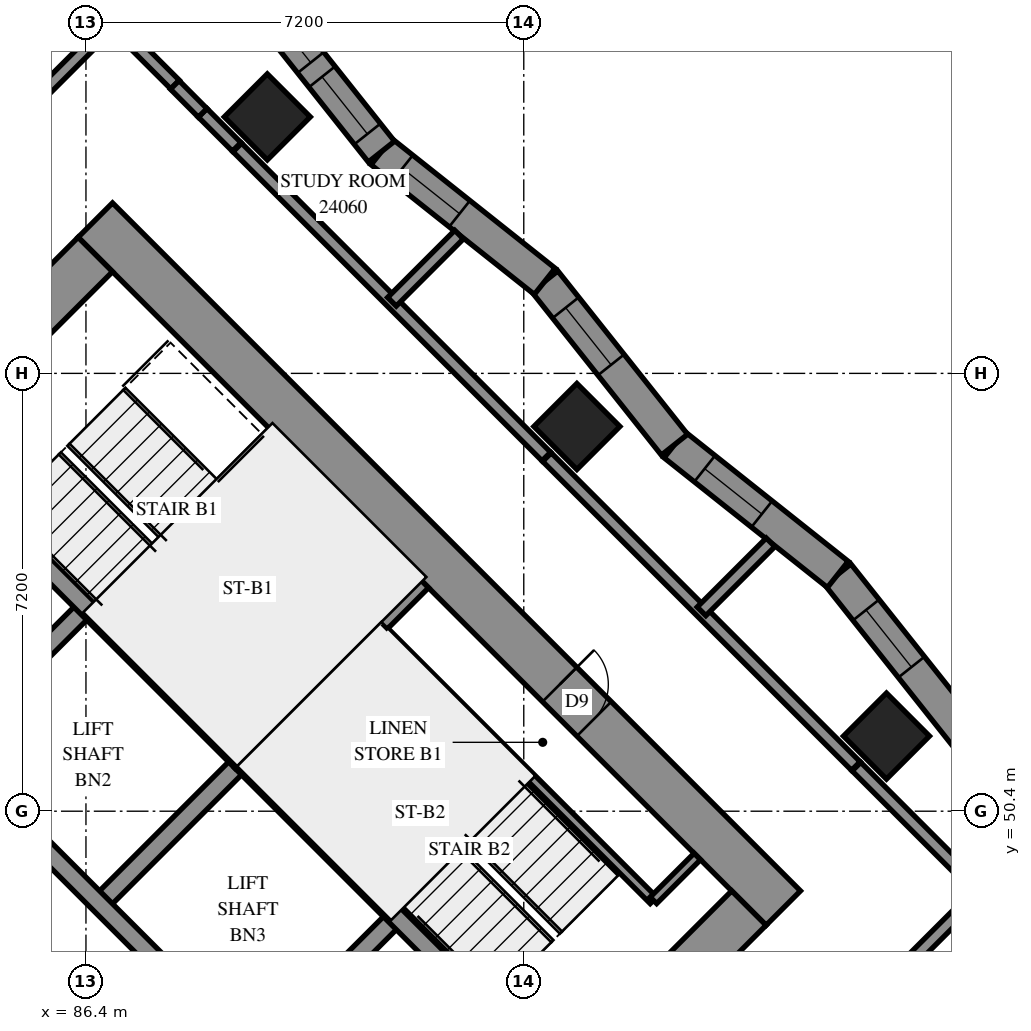
"""IFC4 building model, lengths in metres.
Left out: names, types, materials, properties, quantities, classifications, styles, units other than length and angle.
Written with IfcOpenShell. Run it as: python <this file> out.ifc"""

import sys

from ifc_helpers import new_model, si_unit, direction, frame, frame_2d, origin, origin_2d, place, context, subcontext, project, spatial, polyline, rectangle, outline, extrude, element, fill, save


model = new_model("IFC4")
c1 = context("Model", 3, precision=1e-05, world=origin(), true_north=direction((0.0, 1.0)))
c2 = subcontext(c1, "Body", "Model", "MODEL_VIEW")
j1 = project(units=[si_unit("LENGTHUNIT", "METRE"), si_unit("PLANEANGLEUNIT", "RADIAN")], contexts=[c1])
p1 = place(None, origin())
s1 = spatial("IfcSite", under=j1, at=p1, CompositionType="ELEMENT")
p2 = place(p1, origin())
s2 = spatial("IfcBuilding", under=s1, at=p2, CompositionType="ELEMENT")
p3 = place(p2, frame((0.0, 0.0, 91.4)))
s3 = spatial("IfcBuildingStorey", under=s2, at=p3, CompositionType="ELEMENT", Elevation=91.4)
for number, where, z_axis, x_axis in (
    (1, (89.382, 61.818, 0.0), (0.0, 0.0, 1.0), (0.707, -0.707, 0.0)),
    (2, (94.474, 56.727, 0.0), (0.0, 0.0, 1.0), (0.707, -0.707, 0.0)),
    (3, (99.565, 51.635, 0.0), (0.0, 0.0, 1.0), (0.707, -0.707, 0.0)),
):
    element("IfcColumn", number, at=place(p3, frame(where, z_axis=z_axis, x_axis=x_axis)), inside=s3, PredefinedType="COLUMN", context=c2, shape_type="SweptSolid", body=[
        extrude(rectangle(XDim=1.0, YDim=1.0, at=origin_2d()), origin(), (0.0, 0.0, 1.0), 3.1),
    ])
p4 = place(p3, frame((75.806, 49.373, -0.3), z_axis=(0.0, 0.0, 1.0), x_axis=(0.7071067812, -0.7071067812, 0.0)))
e4 = element("IfcWall", 4, at=p4, inside=s3, PredefinedType="SHEAR", context=c2, shape_type="SweptSolid", body=[
    extrude(rectangle(XDim=16.0, YDim=0.8, at=frame_2d((8.0, 0.0))), origin(), (0.0, 0.0, 1.0), 2.7),
])
p5 = place(p3, frame((86.554, 60.121, -0.3), z_axis=(0.0, 0.0, 1.0), x_axis=(0.7071067812, -0.7071067812, 0.0)))
e5 = element("IfcWall", 5, at=p5, inside=s3, PredefinedType="SHEAR", context=c2, shape_type="SweptSolid", body=[
    extrude(rectangle(XDim=16.0, YDim=0.8, at=frame_2d((8.0, 0.0))), origin(), (0.0, 0.0, 1.0), 2.7),
])
p6 = place(p5, frame((10.8, 0.0, 0.3)))
e6 = element("IfcOpeningElement", 6, at=p6, cuts=e5, PredefinedType="OPENING", context=c2, shape_type="SweptSolid", body=[
    extrude(rectangle(XDim=0.8, YDim=2.1, at=frame_2d((0.4, 1.05))), frame((0.0, 0.41, 0.0), z_axis=(0.0, -1.0, 0.0), x_axis=(1.0, 0.0, 0.0)), (0.0, 0.0, 1.0), 0.82),
])
p7 = place(p3, frame((76.372, 49.373, -0.3), z_axis=(0.0, 0.0, 1.0), x_axis=(0.7071067812, 0.7071067812, 0.0)))
e7 = element("IfcWall", 7, at=p7, inside=s3, PredefinedType="SHEAR", context=c2, shape_type="SweptSolid", body=[
    extrude(rectangle(XDim=14.4, YDim=0.8, at=frame_2d((7.2, 0.0))), origin(), (0.0, 0.0, 1.0), 2.7),
])
p8 = place(p7, frame((4.55, 0.0, 0.3)))
e8 = element("IfcOpeningElement", 8, at=p8, cuts=e7, PredefinedType="OPENING", context=c2, shape_type="SweptSolid", body=[
    extrude(rectangle(XDim=1.1, YDim=2.1, at=frame_2d((0.55, 1.05))), frame((0.0, 0.41, 0.0), z_axis=(0.0, -1.0, 0.0), x_axis=(1.0, 0.0, 0.0)), (0.0, 0.0, 1.0), 0.82),
])
p9 = place(p7, frame((11.35, 0.0, 0.3)))
e9 = element("IfcOpeningElement", 9, at=p9, cuts=e7, PredefinedType="OPENING", context=c2, shape_type="SweptSolid", body=[
    extrude(rectangle(XDim=1.1, YDim=2.1, at=frame_2d((0.55, 1.05))), frame((0.0, 0.41, 0.0), z_axis=(0.0, -1.0, 0.0), x_axis=(1.0, 0.0, 0.0)), (0.0, 0.0, 1.0), 0.82),
])
p10 = place(p3, frame((87.12, 38.625, -0.3), z_axis=(0.0, 0.0, 1.0), x_axis=(0.7071067812, 0.7071067812, 0.0)))
e10 = element("IfcWall", 10, at=p10, inside=s3, PredefinedType="SHEAR", context=c2, shape_type="SweptSolid", body=[
    extrude(rectangle(XDim=14.4, YDim=0.8, at=frame_2d((7.2, 0.0))), origin(), (0.0, 0.0, 1.0), 2.7),
])
p11 = place(p10, frame((4.55, 0.0, 0.3)))
e11 = element("IfcOpeningElement", 11, at=p11, cuts=e10, PredefinedType="OPENING", context=c2, shape_type="SweptSolid", body=[
    extrude(rectangle(XDim=1.1, YDim=2.1, at=frame_2d((0.55, 1.05))), frame((0.0, 0.41, 0.0), z_axis=(0.0, -1.0, 0.0), x_axis=(1.0, 0.0, 0.0)), (0.0, 0.0, 1.0), 0.82),
])
p12 = place(p10, frame((11.35, 0.0, 0.3)))
e12 = element("IfcOpeningElement", 12, at=p12, cuts=e10, PredefinedType="OPENING", context=c2, shape_type="SweptSolid", body=[
    extrude(rectangle(XDim=1.1, YDim=2.1, at=frame_2d((0.55, 1.05))), frame((0.0, 0.41, 0.0), z_axis=(0.0, -1.0, 0.0), x_axis=(1.0, 0.0, 0.0)), (0.0, 0.0, 1.0), 0.82),
])
p13 = place(p3, frame((84.079, 51.423, 0.0), z_axis=(0.0, 0.0, 1.0), x_axis=(0.7071219326, 0.7070916295, 0.0)))
e13 = element("IfcWall", 13, at=p13, inside=s3, PredefinedType="SOLIDWALL", context=c2, shape_type="SweptSolid", body=[
    extrude(rectangle(XDim=3.3, YDim=0.3, at=frame_2d((1.65, 0.0))), origin(), (0.0, 0.0, 1.0), 3.1),
])
for number, where, z_axis, x_axis in (
    (14, (86.625, 48.878, 0.0), (0.0, 0.0, 1.0), (0.707, 0.707, 0.0)),
    (15, (89.17, 46.332, 0.0), (0.0, 0.0, 1.0), (0.707, 0.707, 0.0)),
):
    element("IfcWall", number, at=place(p3, frame(where, z_axis=z_axis, x_axis=x_axis)), inside=s3, PredefinedType="SOLIDWALL", context=c2, shape_type="SweptSolid", body=[
        extrude(rectangle(XDim=3.3, YDim=0.3, at=frame_2d((1.65, 0.0))), origin(), (0.0, 0.0, 1.0), 3.1),
    ])
p14 = place(p3, frame((78.988, 51.423, 0.0), z_axis=(0.0, 0.0, 1.0), x_axis=(0.7071067812, -0.7071067812, 0.0)))
e16 = element("IfcWall", 16, at=p14, inside=s3, PredefinedType="SOLIDWALL", context=c2, shape_type="SweptSolid", body=[
    extrude(rectangle(XDim=14.4, YDim=0.3, at=frame_2d((7.2, 0.0))), origin(), (0.0, 0.0, 1.0), 3.1),
])
p15 = place(p14, frame((1.25, 0.0, 0.0)))
e17 = element("IfcOpeningElement", 17, at=p15, cuts=e16, PredefinedType="OPENING", context=c2, shape_type="SweptSolid", body=[
    extrude(rectangle(XDim=1.1, YDim=2.1, at=frame_2d((0.55, 1.05))), frame((0.0, 0.16, 0.0), z_axis=(0.0, -1.0, 0.0), x_axis=(1.0, 0.0, 0.0)), (0.0, 0.0, 1.0), 0.32),
])
p16 = place(p14, frame((4.85, 0.0, 0.0)))
e18 = element("IfcOpeningElement", 18, at=p16, cuts=e16, PredefinedType="OPENING", context=c2, shape_type="SweptSolid", body=[
    extrude(rectangle(XDim=1.1, YDim=2.1, at=frame_2d((0.55, 1.05))), frame((0.0, 0.16, 0.0), z_axis=(0.0, -1.0, 0.0), x_axis=(1.0, 0.0, 0.0)), (0.0, 0.0, 1.0), 0.32),
])
p17 = place(p14, frame((8.45, 0.0, 0.0)))
e19 = element("IfcOpeningElement", 19, at=p17, cuts=e16, PredefinedType="OPENING", context=c2, shape_type="SweptSolid", body=[
    extrude(rectangle(XDim=1.1, YDim=2.1, at=frame_2d((0.55, 1.05))), frame((0.0, 0.16, 0.0), z_axis=(0.0, -1.0, 0.0), x_axis=(1.0, 0.0, 0.0)), (0.0, 0.0, 1.0), 0.32),
])
p18 = place(p14, frame((12.05, 0.0, 0.0)))
e20 = element("IfcOpeningElement", 20, at=p18, cuts=e16, PredefinedType="OPENING", context=c2, shape_type="SweptSolid", body=[
    extrude(rectangle(XDim=1.1, YDim=2.1, at=frame_2d((0.55, 1.05))), frame((0.0, 0.16, 0.0), z_axis=(0.0, -1.0, 0.0), x_axis=(1.0, 0.0, 0.0)), (0.0, 0.0, 1.0), 0.32),
])
p19 = place(p3, frame((81.534, 53.969, 0.0), z_axis=(0.0, 0.0, 1.0), x_axis=(0.707103309, -0.7071102534, 0.0)))
e21 = element("IfcWall", 21, at=p19, inside=s3, PredefinedType="SOLIDWALL", context=c2, shape_type="SweptSolid", body=[
    extrude(rectangle(XDim=14.4, YDim=0.3, at=frame_2d((7.2, 0.0))), origin(), (0.0, 0.0, 1.0), 3.1),
])
p20 = place(p19, frame((12.05, 0.0, 0.0)))
e22 = element("IfcOpeningElement", 22, at=p20, cuts=e21, PredefinedType="OPENING", context=c2, shape_type="SweptSolid", body=[
    extrude(rectangle(XDim=1.1, YDim=2.1, at=frame_2d((0.55, 1.05))), frame((0.0, 0.16, 0.0), z_axis=(0.0, -1.0, 0.0), x_axis=(1.0, 0.0, 0.0)), (0.0, 0.0, 1.0), 0.32),
])
for number, where, z_axis, x_axis in (
    (23, (83.867, 56.302, 0.0), (0.0, 0.0, 1.0), (0.707, -0.707, 0.0)),
    (24, (88.958, 51.211, 0.0), (0.0, 0.0, 1.0), (0.707, -0.707, 0.0)),
):
    element("IfcWall", number, at=place(p3, frame(where, z_axis=z_axis, x_axis=x_axis)), inside=s3, PredefinedType="SOLIDWALL", context=c2, shape_type="SweptSolid", body=[
        extrude(rectangle(XDim=7.2, YDim=0.3, at=frame_2d((3.6, 0.0))), origin(), (0.0, 0.0, 1.0), 3.1),
    ])
p21 = place(p3, frame((88.958, 51.211, 0.0), z_axis=(0.0, 0.0, 1.0), x_axis=(0.7071067812, 0.7071067812, 0.0)))
e25 = element("IfcWall", 25, at=p21, inside=s3, PredefinedType="SOLIDWALL", context=c2, shape_type="SweptSolid", body=[
    extrude(rectangle(XDim=4.2, YDim=0.3, at=frame_2d((2.1, 0.0))), origin(), (0.0, 0.0, 1.0), 3.1),
])
p22 = place(p3, frame((100.897, 51.608, 0.0), z_axis=(0.0, 0.0, 1.0), x_axis=(-0.621900023, 0.7830966489, 0.0)))
e26 = element("IfcWall", 26, at=p22, inside=s3, PredefinedType="SOLIDWALL", context=c2, shape_type="SweptSolid", body=[
    extrude(outline(polyline([(0.032, -0.275), (3.462, -0.275), (3.398, 0.275), (-0.032, 0.275), (0.032, -0.275)])), origin(), (0.0, 0.0, 1.0), 3.1),
])
p23 = place(p22, frame((1.483, 0.0, 0.5)))
e27 = element("IfcOpeningElement", 27, at=p23, cuts=e26, PredefinedType="OPENING", context=c2, shape_type="SweptSolid", body=[
    extrude(rectangle(XDim=1.2, YDim=2.45, at=frame_2d((0.6, 1.225))), frame((0.0, 0.285, 0.0), z_axis=(0.0, -1.0, 0.0), x_axis=(1.0, 0.0, 0.0)), (0.0, 0.0, 1.0), 0.57),
])
p24 = place(p3, frame((98.764, 54.294, 0.0), z_axis=(0.0, 0.0, 1.0), x_axis=(-0.7831079243, 0.6218858246, 0.0)))
e28 = element("IfcWall", 28, at=p24, inside=s3, PredefinedType="SOLIDWALL", context=c2, shape_type="SweptSolid", body=[
    extrude(outline(polyline([(-0.032, -0.275), (3.398, -0.275), (3.462, 0.275), (0.032, 0.275), (-0.032, -0.275)])), origin(), (0.0, 0.0, 1.0), 3.1),
])
p25 = place(p24, frame((1.596, 0.0, 0.5)))
e29 = element("IfcOpeningElement", 29, at=p25, cuts=e28, PredefinedType="OPENING", context=c2, shape_type="SweptSolid", body=[
    extrude(rectangle(XDim=1.2, YDim=2.45, at=frame_2d((0.6, 1.225))), frame((0.0, 0.285, 0.0), z_axis=(0.0, -1.0, 0.0), x_axis=(1.0, 0.0, 0.0)), (0.0, 0.0, 1.0), 0.57),
])
p26 = place(p3, frame((96.078, 56.427, 0.0), z_axis=(0.0, 0.0, 1.0), x_axis=(-0.6218858246, 0.7831079243, 0.0)))
e30 = element("IfcWall", 30, at=p26, inside=s3, PredefinedType="SOLIDWALL", context=c2, shape_type="SweptSolid", body=[
    extrude(outline(polyline([(0.032, -0.275), (3.462, -0.275), (3.398, 0.275), (-0.032, 0.275), (0.032, -0.275)])), origin(), (0.0, 0.0, 1.0), 3.1),
])
p27 = place(p26, frame((1.677, 0.0, 0.5)))
e31 = element("IfcOpeningElement", 31, at=p27, cuts=e30, PredefinedType="OPENING", context=c2, shape_type="SweptSolid", body=[
    extrude(rectangle(XDim=1.2, YDim=2.45, at=frame_2d((0.6, 1.225))), frame((0.0, 0.285, 0.0), z_axis=(0.0, -1.0, 0.0), x_axis=(1.0, 0.0, 0.0)), (0.0, 0.0, 1.0), 0.57),
])
p28 = place(p3, frame((93.945, 59.113, 0.0), z_axis=(0.0, 0.0, 1.0), x_axis=(-0.7830966489, 0.621900023, 0.0)))
e32 = element("IfcWall", 32, at=p28, inside=s3, PredefinedType="SOLIDWALL", context=c2, shape_type="SweptSolid", body=[
    extrude(outline(polyline([(-0.032, -0.275), (3.398, -0.275), (3.462, 0.275), (0.032, 0.275), (-0.032, -0.275)])), origin(), (0.0, 0.0, 1.0), 3.1),
])
p29 = place(p28, frame((1.789, 0.0, 0.5)))
e33 = element("IfcOpeningElement", 33, at=p29, cuts=e32, PredefinedType="OPENING", context=c2, shape_type="SweptSolid", body=[
    extrude(rectangle(XDim=1.2, YDim=2.45, at=frame_2d((0.6, 1.225))), frame((0.0, 0.285, 0.0), z_axis=(0.0, -1.0, 0.0), x_axis=(1.0, 0.0, 0.0)), (0.0, 0.0, 1.0), 0.57),
])
p30 = place(p3, frame((91.259, 61.246, 0.0), z_axis=(0.0, 0.0, 1.0), x_axis=(-0.6218858246, 0.7831079243, 0.0)))
e34 = element("IfcWall", 34, at=p30, inside=s3, PredefinedType="SOLIDWALL", context=c2, shape_type="SweptSolid", body=[
    extrude(outline(polyline([(0.032, -0.275), (3.462, -0.275), (3.398, 0.275), (-0.032, 0.275), (0.032, -0.275)])), origin(), (0.0, 0.0, 1.0), 3.1),
])
p31 = place(p30, frame((0.371, 0.0, 0.5)))
e35 = element("IfcOpeningElement", 35, at=p31, cuts=e34, PredefinedType="OPENING", context=c2, shape_type="SweptSolid", body=[
    extrude(rectangle(XDim=1.2, YDim=2.45, at=frame_2d((0.6, 1.225))), frame((0.0, 0.285, 0.0), z_axis=(0.0, -1.0, 0.0), x_axis=(1.0, 0.0, 0.0)), (0.0, 0.0, 1.0), 0.57),
])
p32 = place(p30, frame((1.87, 0.0, 0.5)))
e36 = element("IfcOpeningElement", 36, at=p32, cuts=e34, PredefinedType="OPENING", context=c2, shape_type="SweptSolid", body=[
    extrude(rectangle(XDim=1.2, YDim=2.45, at=frame_2d((0.6, 1.225))), frame((0.0, 0.285, 0.0), z_axis=(0.0, -1.0, 0.0), x_axis=(1.0, 0.0, 0.0)), (0.0, 0.0, 1.0), 0.57),
])
p33 = place(p3, frame((91.313, 53.354, 0.0), z_axis=(0.0, 0.0, 1.0), x_axis=(0.7071147811, -0.7070987812, 0.0)))
e37 = element("IfcWall", 37, at=p33, inside=s3, PredefinedType="PARTITIONING", context=c2, shape_type="SweptSolid", body=[
    extrude(rectangle(XDim=6.25, YDim=0.15, at=frame_2d((3.125, 0.0))), origin(), (0.0, 0.0, 1.0), 3.1),
])
p34 = place(p3, frame((95.732, 48.934, 0.0), z_axis=(0.0, 0.0, 1.0), x_axis=(0.7071067812, 0.7071067812, 0.0)))
e38 = element("IfcWall", 38, at=p34, inside=s3, PredefinedType="PARTITIONING", context=c2, shape_type="SweptSolid", body=[
    extrude(rectangle(XDim=1.02, YDim=0.15, at=frame_2d((0.51, 0.0))), origin(), (0.0, 0.0, 1.0), 3.1),
])
p35 = place(p3, frame((94.615, 42.587, 0.0), z_axis=(0.0, 0.0, 1.0), x_axis=(0.7071067812, 0.7071067812, 0.0)))
e39 = element("IfcWall", 39, at=p35, inside=s3, PredefinedType="PARTITIONING", context=c2, shape_type="SweptSolid", body=[
    extrude(rectangle(XDim=9.198, YDim=0.2, at=frame_2d((4.599, 0.0))), origin(), (0.0, 0.0, 1.0), 3.1),
])
p36 = place(p35, frame((0.248, 0.0, 0.0)))
e40 = element("IfcOpeningElement", 40, at=p36, cuts=e39, PredefinedType="OPENING", context=c2, shape_type="SweptSolid", body=[
    extrude(rectangle(XDim=1.0, YDim=2.1, at=frame_2d((0.5, 1.05))), frame((0.0, 0.11, 0.0), z_axis=(0.0, -1.0, 0.0), x_axis=(1.0, 0.0, 0.0)), (0.0, 0.0, 1.0), 0.22),
])
p37 = place(p3, frame((80.949, 58.477, 0.0), z_axis=(0.0, 0.0, 1.0), x_axis=(0.7071122504, 0.707101312, 0.0)))
e41 = element("IfcWall", 41, at=p37, inside=s3, PredefinedType="PARTITIONING", context=c2, shape_type="SweptSolid", body=[
    extrude(rectangle(XDim=9.142, YDim=0.2, at=frame_2d((4.571, 0.0))), origin(), (0.0, 0.0, 1.0), 3.1),
])
p38 = place(p3, frame((96.805, 43.787, 0.0), z_axis=(0.0, 0.0, 1.0), x_axis=(0.7071126983, 0.707100864, 0.0)))
e42 = element("IfcWall", 42, at=p38, inside=s3, PredefinedType="PARTITIONING", context=c2, shape_type="SweptSolid", body=[
    extrude(rectangle(XDim=8.45, YDim=0.2, at=frame_2d((4.225, 0.0))), origin(), (0.0, 0.0, 1.0), 3.1),
])
p39 = place(p3, frame((80.951, 57.489, 0.0), z_axis=(0.0, 0.0, 1.0), x_axis=(0.7071067812, 0.7071067812, 0.0)))
e43 = element("IfcWall", 43, at=p39, inside=s3, PredefinedType="PARTITIONING", context=c2, shape_type="SweptSolid", body=[
    extrude(rectangle(XDim=8.321, YDim=0.2, at=frame_2d((4.161, 0.0))), origin(), (0.0, 0.0, 1.0), 3.1),
])
p40 = place(p39, frame((0.851, 0.0, 0.0)))
e44 = element("IfcOpeningElement", 44, at=p40, cuts=e43, PredefinedType="OPENING", context=c2, shape_type="SweptSolid", body=[
    extrude(rectangle(XDim=1.0, YDim=2.1, at=frame_2d((0.5, 1.05))), frame((0.0, 0.11, 0.0), z_axis=(0.0, -1.0, 0.0), x_axis=(1.0, 0.0, 0.0)), (0.0, 0.0, 1.0), 0.22),
])
p41 = place(p3, frame((88.889, 61.315, 0.0), z_axis=(0.0, 0.0, 1.0), x_axis=(0.7071067812, -0.7071067812, 0.0)))
e45 = element("IfcWall", 45, at=p41, inside=s3, PredefinedType="PARTITIONING", context=c2, shape_type="SweptSolid", body=[
    extrude(rectangle(XDim=7.187, YDim=0.2, at=frame_2d((3.594, 0.0))), origin(), (0.0, 0.0, 1.0), 3.1),
])
p42 = place(p3, frame((93.981, 56.223, 0.0), z_axis=(0.0, 0.0, 1.0), x_axis=(0.7071067812, -0.7071067812, 0.0)))
e46 = element("IfcWall", 46, at=p42, inside=s3, PredefinedType="PARTITIONING", context=c2, shape_type="SweptSolid", body=[
    extrude(rectangle(XDim=7.184, YDim=0.2, at=frame_2d((3.592, 0.0))), origin(), (0.0, 0.0, 1.0), 3.1),
])
p43 = place(p3, frame((99.071, 51.133, 0.0), z_axis=(0.0, 0.0, 1.0), x_axis=(0.7071067812, -0.7071067812, 0.0)))
e47 = element("IfcWall", 47, at=p43, inside=s3, PredefinedType="PARTITIONING", context=c2, shape_type="SweptSolid", body=[
    extrude(rectangle(XDim=2.893, YDim=0.2, at=frame_2d((1.447, 0.0))), origin(), (0.0, 0.0, 1.0), 3.1),
])
p44 = place(p3, frame((96.523, 53.687, 0.0), z_axis=(0.0, 0.0, 1.0), x_axis=(0.7070756263, 0.7071379347, 0.0)))
e48 = element("IfcWall", 48, at=p44, inside=s3, PredefinedType="PARTITIONING", context=c2, shape_type="SweptSolid", body=[
    extrude(rectangle(XDim=1.605, YDim=0.2, at=frame_2d((0.802, 0.0))), origin(), (0.0, 0.0, 1.0), 3.1),
])
p45 = place(p3, frame((91.432, 58.778, 0.0), z_axis=(0.0, 0.0, 1.0), x_axis=(0.7071067812, 0.7071067812, 0.0)))
e49 = element("IfcWall", 49, at=p45, inside=s3, PredefinedType="PARTITIONING", context=c2, shape_type="SweptSolid", body=[
    extrude(rectangle(XDim=1.561, YDim=0.2, at=frame_2d((0.78, 0.0))), origin(), (0.0, 0.0, 1.0), 3.1),
])
p46 = place(p3, frame((86.839, 63.373, 0.0), z_axis=(0.0, 0.0, 1.0), x_axis=(0.7077963046, -0.7064165847, 0.0)))
e50 = element("IfcWall", 50, at=p46, inside=s3, PredefinedType="PARTITIONING", context=c2, shape_type="SweptSolid", body=[
    extrude(rectangle(XDim=1.45, YDim=0.2, at=frame_2d((0.725, 0.0))), origin(), (0.0, 0.0, 1.0), 3.1),
])
p47 = place(p3, frame((88.319, 61.885, 0.0), z_axis=(0.0, 0.0, 1.0), x_axis=(0.7071067812, -0.7071067812, 0.0)))
e51 = element("IfcWall", 51, at=p47, inside=s3, PredefinedType="PARTITIONING", context=c2, shape_type="SweptSolid", body=[
    extrude(rectangle(XDim=0.792, YDim=0.2, at=frame_2d((0.396, 0.0))), origin(), (0.0, 0.0, 1.0), 3.1),
])
p48 = place(p3, frame((87.861, 62.344, 0.0), z_axis=(0.0, 0.0, 1.0), x_axis=(0.7055645691, -0.708645637, 0.0)))
e52 = element("IfcWall", 52, at=p48, inside=s3, PredefinedType="PARTITIONING", context=c2, shape_type="SweptSolid", body=[
    extrude(rectangle(XDim=0.649, YDim=0.2, at=frame_2d((0.325, 0.0))), origin(), (0.0, 0.0, 1.0), 3.1),
])
p49 = place(p23, origin())
e53 = element("IfcWindow", 53, at=p49, inside=s3, PartitioningType="SINGLE_PANEL", PredefinedType="WINDOW", context=c2, shape_type="SweptSolid", body=[
    extrude(rectangle(XDim=1.2, YDim=2.45, at=frame_2d((0.6, 1.225))), frame((0.0, 0.155, 0.0), z_axis=(0.0, -1.0, 0.0), x_axis=(1.0, 0.0, 0.0)), (0.0, 0.0, 1.0), 0.06),
])
fill(e27, e53)
p50 = place(p25, origin())
e54 = element("IfcWindow", 54, at=p50, inside=s3, PartitioningType="SINGLE_PANEL", PredefinedType="WINDOW", context=c2, shape_type="SweptSolid", body=[
    extrude(rectangle(XDim=1.2, YDim=2.45, at=frame_2d((0.6, 1.225))), frame((0.0, 0.155, 0.0), z_axis=(0.0, -1.0, 0.0), x_axis=(1.0, 0.0, 0.0)), (0.0, 0.0, 1.0), 0.06),
])
fill(e29, e54)
p51 = place(p27, origin())
e55 = element("IfcWindow", 55, at=p51, inside=s3, PartitioningType="SINGLE_PANEL", PredefinedType="WINDOW", context=c2, shape_type="SweptSolid", body=[
    extrude(rectangle(XDim=1.2, YDim=2.45, at=frame_2d((0.6, 1.225))), frame((0.0, 0.155, 0.0), z_axis=(0.0, -1.0, 0.0), x_axis=(1.0, 0.0, 0.0)), (0.0, 0.0, 1.0), 0.06),
])
fill(e31, e55)
p52 = place(p29, origin())
e56 = element("IfcWindow", 56, at=p52, inside=s3, PartitioningType="SINGLE_PANEL", PredefinedType="WINDOW", context=c2, shape_type="SweptSolid", body=[
    extrude(rectangle(XDim=1.2, YDim=2.45, at=frame_2d((0.6, 1.225))), frame((0.0, 0.155, 0.0), z_axis=(0.0, -1.0, 0.0), x_axis=(1.0, 0.0, 0.0)), (0.0, 0.0, 1.0), 0.06),
])
fill(e33, e56)
p53 = place(p31, origin())
e57 = element("IfcWindow", 57, at=p53, inside=s3, PartitioningType="SINGLE_PANEL", PredefinedType="WINDOW", context=c2, shape_type="SweptSolid", body=[
    extrude(rectangle(XDim=1.2, YDim=2.45, at=frame_2d((0.6, 1.225))), frame((0.0, 0.155, 0.0), z_axis=(0.0, -1.0, 0.0), x_axis=(1.0, 0.0, 0.0)), (0.0, 0.0, 1.0), 0.06),
])
fill(e35, e57)
p54 = place(p32, origin())
e58 = element("IfcWindow", 58, at=p54, inside=s3, PartitioningType="SINGLE_PANEL", PredefinedType="WINDOW", context=c2, shape_type="SweptSolid", body=[
    extrude(rectangle(XDim=1.2, YDim=2.45, at=frame_2d((0.6, 1.225))), frame((0.0, 0.155, 0.0), z_axis=(0.0, -1.0, 0.0), x_axis=(1.0, 0.0, 0.0)), (0.0, 0.0, 1.0), 0.06),
])
fill(e36, e58)
p55 = place(p6, origin())
e59 = element("IfcDoor", 59, at=p55, inside=s3, OperationType="SINGLE_SWING_RIGHT", PredefinedType="DOOR", context=c2, shape_type="SweptSolid", body=[
    extrude(rectangle(XDim=0.8, YDim=2.1, at=frame_2d((0.4, 1.05))), frame((0.0, -0.34, 0.0), z_axis=(0.0, -1.0, 0.0), x_axis=(1.0, 0.0, 0.0)), (0.0, 0.0, 1.0), 0.05),
])
fill(e6, e59)
save(model, sys.argv[1])
